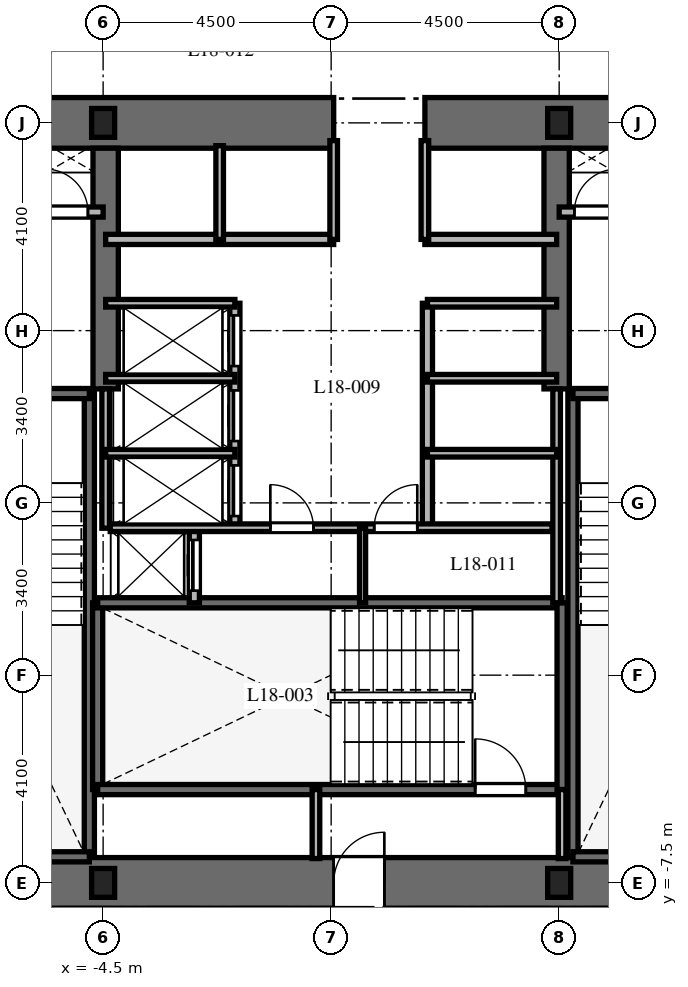
"""IFC4 building model, lengths in metres.
Left out: names, types, materials, properties, quantities, classifications, styles, units other than length and angle.
Written with IfcOpenShell. Run it as: python <this file> out.ifc"""

import sys

from ifc_helpers import new_model, si_unit, direction, frame, frame_2d, origin, origin_2d, place, context, subcontext, project, spatial, rectangle, i_section, extrude, element, fill, save


model = new_model("IFC4")
c1 = context("Model", 3, precision=1e-05, world=origin(), true_north=direction((0.0, 1.0)))
c2 = subcontext(c1, "Body", "Model", "MODEL_VIEW")
j1 = project(units=[si_unit("LENGTHUNIT", "METRE"), si_unit("PLANEANGLEUNIT", "RADIAN")], contexts=[c1])
p1 = place(None, origin())
s1 = spatial("IfcSite", under=j1, at=p1, CompositionType="ELEMENT")
p2 = place(p1, origin())
s2 = spatial("IfcBuilding", under=s1, at=p2, CompositionType="ELEMENT")
p3 = place(p2, frame((0.0, 0.0, 78.6)))
s3 = spatial("IfcBuildingStorey", under=s2, at=p3, CompositionType="ELEMENT", Elevation=78.6)
p4 = place(p3, frame((-9.5, -7.5, 0.0), z_axis=(0.0, 0.0, 1.0), x_axis=(1.0, 0.0, 0.0)))
e1 = element("IfcWall", 1, at=p4, inside=s3, PredefinedType="SHEAR", context=c2, shape_type="SweptSolid", body=[
    extrude(rectangle(XDim=19.0, YDim=1.0, at=frame_2d((9.5, 0.0))), origin(), (0.0, 0.0, 1.0), 3.7),
])
p5 = place(p4, frame((9.55, 0.0, 0.0)))
e2 = element("IfcOpeningElement", 2, at=p5, cuts=e1, PredefinedType="OPENING", context=c2, shape_type="SweptSolid", body=[
    extrude(rectangle(XDim=1.0, YDim=2.15, at=frame_2d((0.5, 1.075))), frame((0.0, 0.51, 0.0), z_axis=(0.0, -1.0, 0.0), x_axis=(1.0, 0.0, 0.0)), (0.0, 0.0, 1.0), 1.02),
])
p6 = place(p3, frame((-9.5, 7.5, 0.0), z_axis=(0.0, 0.0, 1.0), x_axis=(1.0, 0.0, 0.0)))
e3 = element("IfcWall", 3, at=p6, inside=s3, PredefinedType="SHEAR", context=c2, shape_type="SweptSolid", body=[
    extrude(rectangle(XDim=9.55, YDim=1.0, at=frame_2d((4.775, 0.0))), origin(), (0.0, 0.0, 1.0), 3.7),
])
p7 = place(p3, frame((1.85, 7.5, 0.0), z_axis=(0.0, 0.0, 1.0), x_axis=(1.0, 0.0, 0.0)))
e4 = element("IfcWall", 4, at=p7, inside=s3, PredefinedType="SHEAR", context=c2, shape_type="SweptSolid", body=[
    extrude(rectangle(XDim=7.65, YDim=1.0, at=frame_2d((3.825, 0.0))), origin(), (0.0, 0.0, 1.0), 3.7),
])
for number, where, z_axis, x_axis in (
    (5, (-4.45, 2.25, 0.0), (0.0, 0.0, 1.0), (0.0, 1.0, 0.0)),
    (6, (4.45, 2.25, 0.0), (0.0, 0.0, 1.0), (0.0, 1.0, 0.0)),
):
    element("IfcWall", number, at=place(p3, frame(where, z_axis=z_axis, x_axis=x_axis)), inside=s3, PredefinedType="SHEAR", context=c2, shape_type="SweptSolid", body=[
        extrude(rectangle(XDim=4.75, YDim=0.5, at=frame_2d((2.375, 0.0))), origin(), (0.0, 0.0, 1.0), 3.7),
    ])
p8 = place(p3, frame((-4.772, -6.985, 0.0), z_axis=(0.0, 0.0, 1.0), x_axis=(0.0, 1.0, 0.0)))
e7 = element("IfcWall", 7, at=p8, inside=s3, PredefinedType="SHEAR", context=c2, shape_type="SweptSolid", body=[
    extrude(rectangle(XDim=9.143, YDim=0.2, at=frame_2d((4.572, 0.0))), origin(), (0.0, 0.0, 1.0), 3.7),
])
p9 = place(p3, frame((-8.458, -6.985, 0.0), z_axis=(0.0, 0.0, 1.0), x_axis=(1.0, 0.0, 0.0)))
e8 = element("IfcWall", 8, at=p9, inside=s3, PredefinedType="SHEAR", context=c2, shape_type="SweptSolid", body=[
    extrude(rectangle(XDim=3.686, YDim=0.2, at=frame_2d((1.843, 0.0))), origin(), (0.0, 0.0, 1.0), 3.7),
])
p10 = place(p3, frame((-8.458, 2.158, 0.0), z_axis=(0.0, 0.0, 1.0), x_axis=(1.0, 0.0, 0.0)))
e9 = element("IfcWall", 9, at=p10, inside=s3, PredefinedType="SHEAR", context=c2, shape_type="SweptSolid", body=[
    extrude(rectangle(XDim=3.686, YDim=0.2, at=frame_2d((1.843, 0.0))), origin(), (0.0, 0.0, 1.0), 3.7),
])
p11 = place(p10, frame((1.3, 0.0, 0.0)))
e10 = element("IfcOpeningElement", 10, at=p11, cuts=e9, PredefinedType="OPENING", context=c2, shape_type="SweptSolid", body=[
    extrude(rectangle(XDim=1.0, YDim=2.15, at=frame_2d((0.5, 1.075))), frame((0.0, 0.11, 0.0), z_axis=(0.0, -1.0, 0.0), x_axis=(1.0, 0.0, 0.0)), (0.0, 0.0, 1.0), 0.22),
])
p12 = place(p3, frame((4.772, -6.985, 0.0), z_axis=(0.0, 0.0, 1.0), x_axis=(0.0, 1.0, 0.0)))
e11 = element("IfcWall", 11, at=p12, inside=s3, PredefinedType="SHEAR", context=c2, shape_type="SweptSolid", body=[
    extrude(rectangle(XDim=9.143, YDim=0.2, at=frame_2d((4.572, 0.0))), origin(), (0.0, 0.0, 1.0), 3.7),
])
p13 = place(p3, frame((4.772, -6.985, 0.0), z_axis=(0.0, 0.0, 1.0), x_axis=(1.0, 0.0, 0.0)))
e12 = element("IfcWall", 12, at=p13, inside=s3, PredefinedType="SHEAR", context=c2, shape_type="SweptSolid", body=[
    extrude(rectangle(XDim=3.686, YDim=0.2, at=frame_2d((1.843, 0.0))), origin(), (0.0, 0.0, 1.0), 3.7),
])
p14 = place(p3, frame((4.772, 2.158, 0.0), z_axis=(0.0, 0.0, 1.0), x_axis=(1.0, 0.0, 0.0)))
e13 = element("IfcWall", 13, at=p14, inside=s3, PredefinedType="SHEAR", context=c2, shape_type="SweptSolid", body=[
    extrude(rectangle(XDim=3.686, YDim=0.2, at=frame_2d((1.843, 0.0))), origin(), (0.0, 0.0, 1.0), 3.7),
])
p15 = place(p14, frame((1.35, 0.0, 0.0)))
e14 = element("IfcOpeningElement", 14, at=p15, cuts=e13, PredefinedType="OPENING", context=c2, shape_type="SweptSolid", body=[
    extrude(rectangle(XDim=1.0, YDim=2.15, at=frame_2d((0.5, 1.075))), frame((0.0, 0.11, 0.0), z_axis=(0.0, -1.0, 0.0), x_axis=(1.0, 0.0, 0.0)), (0.0, 0.0, 1.0), 0.22),
])
p16 = place(p3, frame((-4.608, -5.658, 0.0), z_axis=(0.0, 0.0, 1.0), x_axis=(0.0, 1.0, 0.0)))
e15 = element("IfcWall", 15, at=p16, inside=s3, PredefinedType="SHEAR", context=c2, shape_type="SweptSolid", body=[
    extrude(rectangle(XDim=3.686, YDim=0.2, at=frame_2d((1.843, 0.0))), origin(), (0.0, 0.0, 1.0), 3.7),
])
p17 = place(p3, frame((-4.608, -5.658, 0.0), z_axis=(0.0, 0.0, 1.0), x_axis=(1.0, 0.0, 0.0)))
e16 = element("IfcWall", 16, at=p17, inside=s3, PredefinedType="SHEAR", context=c2, shape_type="SweptSolid", body=[
    extrude(rectangle(XDim=9.166, YDim=0.2, at=frame_2d((4.583, 0.0))), origin(), (0.0, 0.0, 1.0), 3.7),
])
p18 = place(p17, frame((7.45, 0.0, 0.0)))
e17 = element("IfcOpeningElement", 17, at=p18, cuts=e16, PredefinedType="OPENING", context=c2, shape_type="SweptSolid", body=[
    extrude(rectangle(XDim=1.0, YDim=2.15, at=frame_2d((0.5, 1.075))), frame((0.0, 0.11, 0.0), z_axis=(0.0, -1.0, 0.0), x_axis=(1.0, 0.0, 0.0)), (0.0, 0.0, 1.0), 0.22),
])
p19 = place(p3, frame((-4.608, -1.972, 0.0), z_axis=(0.0, 0.0, 1.0), x_axis=(1.0, 0.0, 0.0)))
e18 = element("IfcWall", 18, at=p19, inside=s3, PredefinedType="SHEAR", context=c2, shape_type="SweptSolid", body=[
    extrude(rectangle(XDim=9.166, YDim=0.2, at=frame_2d((4.583, 0.0))), origin(), (0.0, 0.0, 1.0), 3.7),
])
p20 = place(p3, frame((4.558, -5.658, 0.0), z_axis=(0.0, 0.0, 1.0), x_axis=(0.0, 1.0, 0.0)))
e19 = element("IfcWall", 19, at=p20, inside=s3, PredefinedType="SHEAR", context=c2, shape_type="SweptSolid", body=[
    extrude(rectangle(XDim=3.686, YDim=0.2, at=frame_2d((1.843, 0.0))), origin(), (0.0, 0.0, 1.0), 3.7),
])
for number, where, z_axis, x_axis in (
    (20, (-4.5, -7.5, 0.0), (0.0, 0.0, 1.0), (1.0, 0.0, 0.0)),
    (21, (4.5, -7.5, 0.0), (0.0, 0.0, 1.0), (1.0, 0.0, 0.0)),
    (22, (4.5, 7.5, 0.0), (0.0, 0.0, 1.0), (1.0, 0.0, 0.0)),
    (23, (-4.5, 7.5, 0.0), (0.0, 0.0, 1.0), (1.0, 0.0, 0.0)),
):
    element("IfcColumn", number, at=place(p3, frame(where, z_axis=z_axis, x_axis=x_axis)), inside=s3, PredefinedType="COLUMN", context=c2, shape_type="SweptSolid", body=[
        extrude(i_section(OverallWidth=0.454, OverallDepth=0.569, WebThickness=0.078, FlangeThickness=0.125, at=origin_2d()), origin(), (0.0, 0.0, 1.0), 3.7),
    ])
for number, where, z_axis, x_axis in (
    (24, (-0.3, -7.02, 0.0), (0.0, 0.0, 1.0), (0.0, 1.0, 0.0)),
    (25, (4.558, -7.02, 0.0), (0.0, 0.0, 1.0), (0.0, 1.0, 0.0)),
):
    element("IfcWall", number, at=place(p3, frame(where, z_axis=z_axis, x_axis=x_axis)), inside=s3, PredefinedType="PARTITIONING", context=c2, shape_type="SweptSolid", body=[
        extrude(rectangle(XDim=1.362, YDim=0.15, at=frame_2d((0.681, 0.0))), origin(), (0.0, 0.0, 1.0), 3.4),
    ])
p21 = place(p3, frame((-8.55, 5.74, 0.0), z_axis=(0.0, 0.0, 1.0), x_axis=(1.0, 0.0, 0.0)))
e26 = element("IfcWall", 26, at=p21, inside=s3, PredefinedType="PARTITIONING", context=c2, shape_type="SweptSolid", body=[
    extrude(rectangle(XDim=4.05, YDim=0.2, at=frame_2d((2.025, 0.0))), origin(), (0.0, 0.0, 1.0), 3.4),
])
p22 = place(p21, frame((0.75, 0.0, 0.0)))
e27 = element("IfcOpeningElement", 27, at=p22, cuts=e26, PredefinedType="OPENING", context=c2, shape_type="SweptSolid", body=[
    extrude(rectangle(XDim=1.1, YDim=2.2, at=frame_2d((0.55, 1.1))), frame((0.0, 0.11, 0.0), z_axis=(0.0, -1.0, 0.0), x_axis=(1.0, 0.0, 0.0)), (0.0, 0.0, 1.0), 0.22),
])
p23 = place(p21, frame((2.9, 0.0, 0.0)))
e28 = element("IfcOpeningElement", 28, at=p23, cuts=e26, PredefinedType="OPENING", context=c2, shape_type="SweptSolid", body=[
    extrude(rectangle(XDim=0.85, YDim=2.03, at=frame_2d((0.425, 1.015))), frame((0.0, 0.11, 0.0), z_axis=(0.0, -1.0, 0.0), x_axis=(1.0, 0.0, 0.0)), (0.0, 0.0, 1.0), 0.22),
])
p24 = place(p3, frame((4.5, 5.74, 0.0), z_axis=(0.0, 0.0, 1.0), x_axis=(1.0, 0.0, 0.0)))
e29 = element("IfcWall", 29, at=p24, inside=s3, PredefinedType="PARTITIONING", context=c2, shape_type="SweptSolid", body=[
    extrude(rectangle(XDim=4.05, YDim=0.2, at=frame_2d((2.025, 0.0))), origin(), (0.0, 0.0, 1.0), 3.4),
])
p25 = place(p24, frame((0.3, 0.0, 0.0)))
e30 = element("IfcOpeningElement", 30, at=p25, cuts=e29, PredefinedType="OPENING", context=c2, shape_type="SweptSolid", body=[
    extrude(rectangle(XDim=0.85, YDim=2.03, at=frame_2d((0.425, 1.015))), frame((0.0, 0.11, 0.0), z_axis=(0.0, -1.0, 0.0), x_axis=(1.0, 0.0, 0.0)), (0.0, 0.0, 1.0), 0.22),
])
p26 = place(p24, frame((2.15, 0.0, 0.0)))
e31 = element("IfcOpeningElement", 31, at=p26, cuts=e29, PredefinedType="OPENING", context=c2, shape_type="SweptSolid", body=[
    extrude(rectangle(XDim=1.1, YDim=2.2, at=frame_2d((0.55, 1.1))), frame((0.0, 0.11, 0.0), z_axis=(0.0, -1.0, 0.0), x_axis=(1.0, 0.0, 0.0)), (0.0, 0.0, 1.0), 0.22),
])
p27 = place(p3, frame((-2.7, -1.972, 0.0), z_axis=(0.0, 0.0, 1.0), x_axis=(0.0, 1.0, 0.0)))
e32 = element("IfcWall", 32, at=p27, inside=s3, PredefinedType="PARTITIONING", context=c2, shape_type="SweptSolid", body=[
    extrude(rectangle(XDim=1.472, YDim=0.2, at=frame_2d((0.736, 0.0))), origin(), (0.0, 0.0, 1.0), 3.4),
])
p28 = place(p27, frame((0.24, 0.0, 0.0)))
e33 = element("IfcOpeningElement", 33, at=p28, cuts=e32, PredefinedType="OPENING", context=c2, shape_type="SweptSolid", body=[
    extrude(rectangle(XDim=1.0, YDim=2.2, at=frame_2d((0.5, 1.1))), frame((0.0, 0.11, 0.0), z_axis=(0.0, -1.0, 0.0), x_axis=(1.0, 0.0, 0.0)), (0.0, 0.0, 1.0), 0.22),
])
p29 = place(p3, frame((-4.45, 5.2, 0.0), z_axis=(0.0, 0.0, 1.0), x_axis=(1.0, 0.0, 0.0)))
e34 = element("IfcWall", 34, at=p29, inside=s3, PredefinedType="PARTITIONING", context=c2, shape_type="SweptSolid", body=[
    extrude(rectangle(XDim=4.5, YDim=0.2, at=frame_2d((2.25, 0.0))), origin(), (0.0, 0.0, 1.0), 3.4),
])
p30 = place(p3, frame((1.85, 5.2, 0.0), z_axis=(0.0, 0.0, 1.0), x_axis=(1.0, 0.0, 0.0)))
e35 = element("IfcWall", 35, at=p30, inside=s3, PredefinedType="PARTITIONING", context=c2, shape_type="SweptSolid", body=[
    extrude(rectangle(XDim=2.6, YDim=0.2, at=frame_2d((1.3, 0.0))), origin(), (0.0, 0.0, 1.0), 3.4),
])
p31 = place(p3, frame((-2.2, 5.2, 0.0), z_axis=(0.0, 0.0, 1.0), x_axis=(0.0, 1.0, 0.0)))
e36 = element("IfcWall", 36, at=p31, inside=s3, PredefinedType="PARTITIONING", context=c2, shape_type="SweptSolid", body=[
    extrude(rectangle(XDim=1.85, YDim=0.15, at=frame_2d((0.925, 0.0))), origin(), (0.0, 0.0, 1.0), 3.4),
])
for number, where, z_axis, x_axis in (
    (37, (0.05, 5.2, 0.0), (0.0, 0.0, 1.0), (0.0, 1.0, 0.0)),
    (38, (1.85, 5.2, 0.0), (0.0, 0.0, 1.0), (0.0, 1.0, 0.0)),
):
    element("IfcWall", number, at=place(p3, frame(where, z_axis=z_axis, x_axis=x_axis)), inside=s3, PredefinedType="PARTITIONING", context=c2, shape_type="SweptSolid", body=[
        extrude(rectangle(XDim=1.95, YDim=0.15, at=frame_2d((0.975, 0.0))), origin(), (0.0, 0.0, 1.0), 3.4),
    ])
p32 = place(p3, frame((-4.45, -0.5, 0.0), z_axis=(0.0, 0.0, 1.0), x_axis=(0.0, 1.0, 0.0)))
e39 = element("IfcWall", 39, at=p32, inside=s3, PredefinedType="PARTITIONING", context=c2, shape_type="SweptSolid", body=[
    extrude(rectangle(XDim=2.75, YDim=0.15, at=frame_2d((1.375, 0.0))), origin(), (0.0, 0.0, 1.0), 3.4),
])
p33 = place(p3, frame((4.45, -1.972, 0.0), z_axis=(0.0, 0.0, 1.0), x_axis=(0.0, 1.0, 0.0)))
e40 = element("IfcWall", 40, at=p33, inside=s3, PredefinedType="PARTITIONING", context=c2, shape_type="SweptSolid", body=[
    extrude(rectangle(XDim=4.222, YDim=0.15, at=frame_2d((2.111, 0.0))), origin(), (0.0, 0.0, 1.0), 3.4),
])
p34 = place(p3, frame((-1.9, -0.5, 0.0), z_axis=(0.0, 0.0, 1.0), x_axis=(0.0, 1.0, 0.0)))
e41 = element("IfcWall", 41, at=p34, inside=s3, PredefinedType="PARTITIONING", context=c2, shape_type="SweptSolid", body=[
    extrude(rectangle(XDim=4.44, YDim=0.2, at=frame_2d((2.22, 0.0))), origin(), (0.0, 0.0, 1.0), 3.4),
])
p35 = place(p34, frame((0.24, 0.0, 0.0)))
e42 = element("IfcOpeningElement", 42, at=p35, cuts=e41, PredefinedType="OPENING", context=c2, shape_type="SweptSolid", body=[
    extrude(rectangle(XDim=1.0, YDim=2.2, at=frame_2d((0.5, 1.1))), frame((0.0, 0.11, 0.0), z_axis=(0.0, -1.0, 0.0), x_axis=(1.0, 0.0, 0.0)), (0.0, 0.0, 1.0), 0.22),
])
p36 = place(p34, frame((1.72, 0.0, 0.0)))
e43 = element("IfcOpeningElement", 43, at=p36, cuts=e41, PredefinedType="OPENING", context=c2, shape_type="SweptSolid", body=[
    extrude(rectangle(XDim=1.0, YDim=2.2, at=frame_2d((0.5, 1.1))), frame((0.0, 0.11, 0.0), z_axis=(0.0, -1.0, 0.0), x_axis=(1.0, 0.0, 0.0)), (0.0, 0.0, 1.0), 0.22),
])
p37 = place(p34, frame((3.2, 0.0, 0.0)))
e44 = element("IfcOpeningElement", 44, at=p37, cuts=e41, PredefinedType="OPENING", context=c2, shape_type="SweptSolid", body=[
    extrude(rectangle(XDim=1.0, YDim=2.2, at=frame_2d((0.5, 1.1))), frame((0.0, 0.11, 0.0), z_axis=(0.0, -1.0, 0.0), x_axis=(1.0, 0.0, 0.0)), (0.0, 0.0, 1.0), 0.22),
])
for number, where, z_axis, x_axis in (
    (45, (-4.45, 3.94, 0.0), (0.0, 0.0, 1.0), (1.0, 0.0, 0.0)),
    (46, (-4.45, 0.98, 0.0), (0.0, 0.0, 1.0), (1.0, 0.0, 0.0)),
    (47, (-4.45, 2.46, 0.0), (0.0, 0.0, 1.0), (1.0, 0.0, 0.0)),
):
    element("IfcWall", number, at=place(p3, frame(where, z_axis=z_axis, x_axis=x_axis)), inside=s3, PredefinedType="PARTITIONING", context=c2, shape_type="SweptSolid", body=[
        extrude(rectangle(XDim=2.55, YDim=0.15, at=frame_2d((1.275, 0.0))), origin(), (0.0, 0.0, 1.0), 3.4),
    ])
p38 = place(p3, frame((1.9, -0.5, 0.0), z_axis=(0.0, 0.0, 1.0), x_axis=(0.0, 1.0, 0.0)))
e48 = element("IfcWall", 48, at=p38, inside=s3, PredefinedType="PARTITIONING", context=c2, shape_type="SweptSolid", body=[
    extrude(rectangle(XDim=4.44, YDim=0.2, at=frame_2d((2.22, 0.0))), origin(), (0.0, 0.0, 1.0), 3.4),
])
for number, where, z_axis, x_axis in (
    (49, (1.9, 3.94, 0.0), (0.0, 0.0, 1.0), (1.0, 0.0, 0.0)),
    (50, (1.9, 0.98, 0.0), (0.0, 0.0, 1.0), (1.0, 0.0, 0.0)),
    (51, (1.9, 2.46, 0.0), (0.0, 0.0, 1.0), (1.0, 0.0, 0.0)),
):
    element("IfcWall", number, at=place(p3, frame(where, z_axis=z_axis, x_axis=x_axis)), inside=s3, PredefinedType="PARTITIONING", context=c2, shape_type="SweptSolid", body=[
        extrude(rectangle(XDim=2.55, YDim=0.15, at=frame_2d((1.275, 0.0))), origin(), (0.0, 0.0, 1.0), 3.4),
    ])
p39 = place(p3, frame((-4.36, -0.49, 0.0), z_axis=(0.0, 0.0, 1.0), x_axis=(1.0, 0.0, 0.0)))
e52 = element("IfcWall", 52, at=p39, inside=s3, PredefinedType="PARTITIONING", context=c2, shape_type="SweptSolid", body=[
    extrude(rectangle(XDim=8.72, YDim=0.15, at=frame_2d((4.36, 0.0))), origin(), (0.0, 0.0, 1.0), 3.4),
])
p40 = place(p39, frame((3.16, 0.0, 0.0)))
e53 = element("IfcOpeningElement", 53, at=p40, cuts=e52, PredefinedType="OPENING", context=c2, shape_type="SweptSolid", body=[
    extrude(rectangle(XDim=0.85, YDim=2.03, at=frame_2d((0.425, 1.015))), frame((0.0, 0.085, 0.0), z_axis=(0.0, -1.0, 0.0), x_axis=(1.0, 0.0, 0.0)), (0.0, 0.0, 1.0), 0.17),
])
p41 = place(p39, frame((5.21, 0.0, 0.0)))
e54 = element("IfcOpeningElement", 54, at=p41, cuts=e52, PredefinedType="OPENING", context=c2, shape_type="SweptSolid", body=[
    extrude(rectangle(XDim=0.85, YDim=2.03, at=frame_2d((0.425, 1.015))), frame((0.0, 0.085, 0.0), z_axis=(0.0, -1.0, 0.0), x_axis=(1.0, 0.0, 0.0)), (0.0, 0.0, 1.0), 0.17),
])
p42 = place(p3, frame((0.62, -1.972, 0.0), z_axis=(0.0, 0.0, 1.0), x_axis=(0.0, 1.0, 0.0)))
e55 = element("IfcWall", 55, at=p42, inside=s3, PredefinedType="PARTITIONING", context=c2, shape_type="SweptSolid", body=[
    extrude(rectangle(XDim=1.472, YDim=0.12, at=frame_2d((0.736, 0.0))), origin(), (0.0, 0.0, 1.0), 3.4),
])
p43 = place(p18, origin())
e56 = element("IfcDoor", 56, at=p43, inside=s3, OperationType="SINGLE_SWING_LEFT", PredefinedType="DOOR", context=c2, shape_type="SweptSolid", body=[
    extrude(rectangle(XDim=1.0, YDim=2.15, at=frame_2d((0.5, 1.075))), frame((0.0, 0.025, 0.0), z_axis=(0.0, -1.0, 0.0), x_axis=(1.0, 0.0, 0.0)), (0.0, 0.0, 1.0), 0.05),
])
fill(e17, e56)
p44 = place(p5, origin())
e57 = element("IfcDoor", 57, at=p44, inside=s3, OperationType="SINGLE_SWING_RIGHT", PredefinedType="DOOR", context=c2, shape_type="SweptSolid", body=[
    extrude(rectangle(XDim=1.0, YDim=2.15, at=frame_2d((0.5, 1.075))), frame((0.0, 0.025, 0.0), z_axis=(0.0, -1.0, 0.0), x_axis=(1.0, 0.0, 0.0)), (0.0, 0.0, 1.0), 0.05),
])
fill(e2, e57)
p45 = place(p23, origin())
e58 = element("IfcDoor", 58, at=p45, inside=s3, OperationType="SINGLE_SWING_LEFT", PredefinedType="DOOR", context=c2, shape_type="SweptSolid", body=[
    extrude(rectangle(XDim=0.85, YDim=2.03, at=frame_2d((0.425, 1.015))), frame((0.0, 0.025, 0.0), z_axis=(0.0, -1.0, 0.0), x_axis=(1.0, 0.0, 0.0)), (0.0, 0.0, 1.0), 0.05),
])
fill(e28, e58)
p46 = place(p25, origin())
e59 = element("IfcDoor", 59, at=p46, inside=s3, OperationType="SINGLE_SWING_RIGHT", PredefinedType="DOOR", context=c2, shape_type="SweptSolid", body=[
    extrude(rectangle(XDim=0.85, YDim=2.03, at=frame_2d((0.425, 1.015))), frame((0.0, 0.025, 0.0), z_axis=(0.0, -1.0, 0.0), x_axis=(1.0, 0.0, 0.0)), (0.0, 0.0, 1.0), 0.05),
])
fill(e30, e59)
p47 = place(p28, origin())
e60 = element("IfcDoor", 60, at=p47, inside=s3, OperationType="SLIDING_TO_LEFT", PredefinedType="DOOR", context=c2, shape_type="SweptSolid", body=[
    extrude(rectangle(XDim=1.0, YDim=2.2, at=frame_2d((0.5, 1.1))), frame((0.0, 0.025, 0.0), z_axis=(0.0, -1.0, 0.0), x_axis=(1.0, 0.0, 0.0)), (0.0, 0.0, 1.0), 0.05),
])
fill(e33, e60)
p48 = place(p35, origin())
e61 = element("IfcDoor", 61, at=p48, inside=s3, OperationType="SLIDING_TO_LEFT", PredefinedType="DOOR", context=c2, shape_type="SweptSolid", body=[
    extrude(rectangle(XDim=1.0, YDim=2.2, at=frame_2d((0.5, 1.1))), frame((0.0, 0.025, 0.0), z_axis=(0.0, -1.0, 0.0), x_axis=(1.0, 0.0, 0.0)), (0.0, 0.0, 1.0), 0.05),
])
fill(e42, e61)
p49 = place(p36, origin())
e62 = element("IfcDoor", 62, at=p49, inside=s3, OperationType="SLIDING_TO_LEFT", PredefinedType="DOOR", context=c2, shape_type="SweptSolid", body=[
    extrude(rectangle(XDim=1.0, YDim=2.2, at=frame_2d((0.5, 1.1))), frame((0.0, 0.025, 0.0), z_axis=(0.0, -1.0, 0.0), x_axis=(1.0, 0.0, 0.0)), (0.0, 0.0, 1.0), 0.05),
])
fill(e43, e62)
p50 = place(p37, origin())
e63 = element("IfcDoor", 63, at=p50, inside=s3, OperationType="SLIDING_TO_LEFT", PredefinedType="DOOR", context=c2, shape_type="SweptSolid", body=[
    extrude(rectangle(XDim=1.0, YDim=2.2, at=frame_2d((0.5, 1.1))), frame((0.0, 0.025, 0.0), z_axis=(0.0, -1.0, 0.0), x_axis=(1.0, 0.0, 0.0)), (0.0, 0.0, 1.0), 0.05),
])
fill(e44, e63)
p51 = place(p40, origin())
e64 = element("IfcDoor", 64, at=p51, inside=s3, OperationType="SINGLE_SWING_LEFT", PredefinedType="DOOR", context=c2, shape_type="SweptSolid", body=[
    extrude(rectangle(XDim=0.85, YDim=2.03, at=frame_2d((0.425, 1.015))), frame((0.0, 0.025, 0.0), z_axis=(0.0, -1.0, 0.0), x_axis=(1.0, 0.0, 0.0)), (0.0, 0.0, 1.0), 0.05),
])
fill(e53, e64)
p52 = place(p41, origin())
e65 = element("IfcDoor", 65, at=p52, inside=s3, OperationType="SINGLE_SWING_RIGHT", PredefinedType="DOOR", context=c2, shape_type="SweptSolid", body=[
    extrude(rectangle(XDim=0.85, YDim=2.03, at=frame_2d((0.425, 1.015))), frame((0.0, 0.025, 0.0), z_axis=(0.0, -1.0, 0.0), x_axis=(1.0, 0.0, 0.0)), (0.0, 0.0, 1.0), 0.05),
])
fill(e54, e65)
save(model, sys.argv[1])
